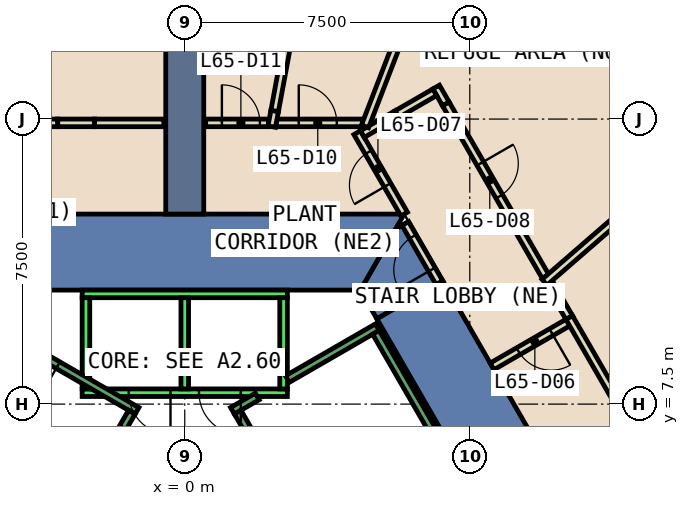
"""IFC4 building model, lengths in metres.
Left out: names, types, materials, properties, quantities, classifications, styles, units other than length and angle.
Written with IfcOpenShell. Run it as: python <this file> out.ifc"""

import sys

from ifc_helpers import new_model, si_unit, direction, frame, frame_2d, origin, place, context, subcontext, project, spatial, polyline, rectangle, outline, extrude, element, fill, save


model = new_model("IFC4")
c1 = context("Model", 3, precision=1e-05, world=origin(), true_north=direction((0.0, 1.0)))
c2 = subcontext(c1, "Body", "Model", "MODEL_VIEW")
j1 = project(units=[si_unit("LENGTHUNIT", "METRE"), si_unit("PLANEANGLEUNIT", "RADIAN")], contexts=[c1])
p1 = place(None, origin())
s1 = spatial("IfcSite", under=j1, at=p1, CompositionType="ELEMENT")
p2 = place(p1, origin())
s2 = spatial("IfcBuilding", under=s1, at=p2, CompositionType="ELEMENT")
p3 = place(p2, frame((0.0, 0.0, 281.0)))
s3 = spatial("IfcBuildingStorey", under=s2, at=p3, CompositionType="ELEMENT", Elevation=281.0)
p4 = place(p3, frame((0.0, 0.0, -0.6)))
e1 = element("IfcWall", 1, at=p4, inside=s3, PredefinedType="SHEAR", context=c2, shape_type="SweptSolid", body=[
    extrude(outline(polyline([(6.786, 10.747), (5.054, 9.747), (9.238, 2.5), (11.547, 2.5), (6.786, 10.747)])), origin(), (0.0, 0.0, 1.0), 5.4),
])
p5 = place(p3, frame((0.0, 0.0, 3.6)))
e2 = element("IfcWall", 2, at=p5, inside=s3, PredefinedType="SHEAR", context=c2, shape_type="SweptSolid", body=[
    extrude(outline(polyline([(5.889, 12.301), (5.544, 12.102), (4.619, 10.5), (5.054, 9.747), (6.786, 10.747), (5.889, 12.301)])), origin(), (0.0, 0.0, 1.0), 1.2),
])
p6 = place(p3, frame((0.0, 0.0, -0.6)))
e3 = element("IfcWall", 3, at=p6, inside=s3, PredefinedType="SHEAR", context=c2, shape_type="SweptSolid", body=[
    extrude(outline(polyline([(5.774, 12.5), (-5.774, 12.5), (-4.619, 10.5), (4.619, 10.5), (5.774, 12.5)])), origin(), (0.0, 0.0, 1.0), 5.4),
])
p7 = place(p3, frame((0.0, 12.5, 0.0), z_axis=(0.0, 0.0, 1.0), x_axis=(0.0, 1.0, 0.0)))
e4 = element("IfcWall", 4, at=p7, inside=s3, PredefinedType="SHEAR", context=c2, shape_type="SweptSolid", body=[
    extrude(rectangle(XDim=16.624, YDim=1.0, at=frame_2d((8.312, 0.0))), origin(), (0.0, 0.0, 1.0), 4.8),
])
p8 = place(p3, frame((10.165, 9.693, 0.0), z_axis=(0.0, 0.0, 1.0), x_axis=(-0.865955154139, -0.50012165622, 0.0)))
e5 = element("IfcWall", 5, at=p8, inside=s3, PredefinedType="PARTITIONING", context=c2, shape_type="SweptSolid", body=[
    extrude(rectangle(XDim=2.4, YDim=0.2, at=frame_2d((1.2, 0.0))), origin(), (0.0, 0.0, 1.0), 2.4),
])
p9 = place(p8, frame((0.6, 0.0, 0.0)))
e6 = element("IfcOpeningElement", 6, at=p9, cuts=e5, PredefinedType="OPENING", context=c2, shape_type="SweptSolid", body=[
    extrude(rectangle(XDim=1.0, YDim=2.1, at=frame_2d((0.5, 1.05))), frame((0.0, 0.11, 0.0), z_axis=(0.0, -1.0, 0.0), x_axis=(1.0, 0.0, 0.0)), (0.0, 0.0, 1.0), 0.22),
])
p10 = place(p3, frame((5.774, 12.5, 0.0), z_axis=(0.0, 0.0, 1.0), x_axis=(-0.500024335136, 0.866011353431, 0.0)))
e7 = element("IfcWall", 7, at=p10, inside=s3, PredefinedType="PARTITIONING", context=c2, shape_type="SweptSolid", body=[
    extrude(rectangle(XDim=2.474, YDim=0.2, at=frame_2d((1.237, 0.0))), origin(), (0.0, 0.0, 1.0), 4.8),
])
p11 = place(p10, frame((0.881, 0.0, 0.0)))
e8 = element("IfcOpeningElement", 8, at=p11, cuts=e7, PredefinedType="OPENING", context=c2, shape_type="SweptSolid", body=[
    extrude(rectangle(XDim=1.0, YDim=2.1, at=frame_2d((0.5, 1.05))), frame((0.0, 0.11, 0.0), z_axis=(0.0, -1.0, 0.0), x_axis=(1.0, 0.0, 0.0)), (0.0, 0.0, 1.0), 0.22),
])
p12 = place(p3, frame((4.674, 14.605, 0.0), z_axis=(0.0, 0.0, 1.0), x_axis=(0.865681519127, 0.500595153234, 0.0)))
e9 = element("IfcWall", 9, at=p12, inside=s3, PredefinedType="PARTITIONING", context=c2, shape_type="SweptSolid", body=[
    extrude(rectangle(XDim=0.589, YDim=0.2, at=frame_2d((0.294, 0.0))), origin(), (0.0, 0.0, 1.0), 4.8),
])
p13 = place(p3, frame((6.615, 15.842, 0.0), z_axis=(0.0, 0.0, 1.0), x_axis=(0.499571276714, -0.866272785837, 0.0)))
e10 = element("IfcWall", 10, at=p13, inside=s3, PredefinedType="PARTITIONING", context=c2, shape_type="SweptSolid", body=[
    extrude(rectangle(XDim=0.513, YDim=0.2, at=frame_2d((0.256, 0.0))), origin(), (0.0, 0.0, 1.0), 2.4),
])
p14 = place(p3, frame((5.184, 14.9, 0.0), z_axis=(0.0, 0.0, 1.0), x_axis=(0.865727674389, 0.500515328234, 0.0)))
e11 = element("IfcWall", 11, at=p14, inside=s3, PredefinedType="PARTITIONING", context=c2, shape_type="SweptSolid", body=[
    extrude(rectangle(XDim=0.462, YDim=0.2, at=frame_2d((0.231, 0.0))), origin(), (0.0, 0.0, 1.0), 4.8),
])
p15 = place(p3, frame((9.592, 10.685, 0.0), z_axis=(0.0, 0.0, 1.0), x_axis=(0.500366091518, -0.865813937552, 0.0)))
e12 = element("IfcWall", 12, at=p15, inside=s3, PredefinedType="PARTITIONING", context=c2, shape_type="SweptSolid", body=[
    extrude(rectangle(XDim=0.23, YDim=0.2, at=frame_2d((0.115, 0.0))), origin(), (0.0, 0.0, 1.0), 4.8),
])
p16 = place(p3, frame((10.115, 9.78, 0.0), z_axis=(0.0, 0.0, 1.0), x_axis=(0.500005696091, -0.86602211512, 0.0)))
e13 = element("IfcWall", 13, at=p16, inside=s3, PredefinedType="PARTITIONING", context=c2, shape_type="SweptSolid", body=[
    extrude(rectangle(XDim=5.82, YDim=0.2, at=frame_2d((2.91, 0.0))), origin(), (0.0, 0.0, 1.0), 2.4),
])
p17 = place(p3, frame((2.407, 14.9, 0.0), z_axis=(0.0, 0.0, 1.0), x_axis=(1.0, 0.0, 0.0)))
e14 = element("IfcWall", 14, at=p17, inside=s3, PredefinedType="PARTITIONING", context=c2, shape_type="SweptSolid", body=[
    extrude(rectangle(XDim=2.272, YDim=0.2, at=frame_2d((1.136, 0.0))), origin(), (0.0, 0.0, 1.0), 4.8),
])
p18 = place(p17, frame((0.593, 0.0, 0.0)))
e15 = element("IfcOpeningElement", 15, at=p18, cuts=e14, PredefinedType="OPENING", context=c2, shape_type="SweptSolid", body=[
    extrude(rectangle(XDim=1.0, YDim=2.1, at=frame_2d((0.5, 1.05))), frame((0.0, 0.11, 0.0), z_axis=(0.0, -1.0, 0.0), x_axis=(1.0, 0.0, 0.0)), (0.0, 0.0, 1.0), 0.22),
])
p19 = place(p3, frame((0.55, 14.9, 0.0), z_axis=(0.0, 0.0, 1.0), x_axis=(1.0, 0.0, 0.0)))
e16 = element("IfcWall", 16, at=p19, inside=s3, PredefinedType="PARTITIONING", context=c2, shape_type="SweptSolid", body=[
    extrude(rectangle(XDim=1.657, YDim=0.2, at=frame_2d((0.829, 0.0))), origin(), (0.0, 0.0, 1.0), 4.8),
])
p20 = place(p19, frame((0.427, 0.0, 0.0)))
e17 = element("IfcOpeningElement", 17, at=p20, cuts=e16, PredefinedType="OPENING", context=c2, shape_type="SweptSolid", body=[
    extrude(rectangle(XDim=1.0, YDim=2.1, at=frame_2d((0.5, 1.05))), frame((0.0, 0.11, 0.0), z_axis=(0.0, -1.0, 0.0), x_axis=(1.0, 0.0, 0.0)), (0.0, 0.0, 1.0), 0.22),
])
p21 = place(p3, frame((4.743, 14.807, 0.0), z_axis=(0.0, 0.0, 1.0), x_axis=(0.359634850081, 0.933093122152, 0.0)))
e18 = element("IfcWall", 18, at=p21, inside=s3, PredefinedType="PARTITIONING", context=c2, shape_type="SweptSolid", body=[
    extrude(rectangle(XDim=10.252, YDim=0.2, at=frame_2d((5.126, 0.0))), origin(), (0.0, 0.0, 1.0), 4.8),
])
p22 = place(p3, frame((2.289, 14.802, 0.0), z_axis=(0.0, 0.0, 1.0), x_axis=(0.183025457922, 0.983108173983, 0.0)))
e19 = element("IfcWall", 19, at=p22, inside=s3, PredefinedType="PARTITIONING", context=c2, shape_type="SweptSolid", body=[
    extrude(rectangle(XDim=0.42, YDim=0.2, at=frame_2d((0.21, 0.0))), origin(), (0.0, 0.0, 1.0), 2.4),
])
p23 = place(p3, frame((6.699, 10.697, 0.0), z_axis=(0.0, 0.0, 1.0), x_axis=(-0.499914839587, 0.866074565589, 0.0)))
e20 = element("IfcWall", 20, at=p23, inside=s3, PredefinedType="PARTITIONING", context=c2, shape_type="SweptSolid", body=[
    extrude(rectangle(XDim=1.794, YDim=0.2, at=frame_2d((0.897, 0.0))), origin(), (0.0, 0.0, 1.0), 2.4),
])
p24 = place(p23, frame((0.397, 0.0, 0.0)))
e21 = element("IfcOpeningElement", 21, at=p24, cuts=e20, PredefinedType="OPENING", context=c2, shape_type="SweptSolid", body=[
    extrude(rectangle(XDim=1.0, YDim=2.1, at=frame_2d((0.5, 1.05))), frame((0.0, 0.11, 0.0), z_axis=(0.0, -1.0, 0.0), x_axis=(1.0, 0.0, 0.0)), (0.0, 0.0, 1.0), 0.22),
])
p25 = place(p3, frame((6.871, 15.398, 0.0), z_axis=(0.0, 0.0, 1.0), x_axis=(0.500031573455, -0.866007174074, 0.0)))
e22 = element("IfcWall", 22, at=p25, inside=s3, PredefinedType="PARTITIONING", context=c2, shape_type="SweptSolid", body=[
    extrude(rectangle(XDim=5.241, YDim=0.2, at=frame_2d((2.621, 0.0))), origin(), (0.0, 0.0, 1.0), 4.8),
])
p26 = place(p25, frame((1.811, 0.0, 0.0)))
e23 = element("IfcOpeningElement", 23, at=p26, cuts=e22, PredefinedType="OPENING", context=c2, shape_type="SweptSolid", body=[
    extrude(rectangle(XDim=1.0, YDim=2.1, at=frame_2d((0.5, 1.05))), frame((0.0, 0.11, 0.0), z_axis=(0.0, -1.0, 0.0), x_axis=(1.0, 0.0, 0.0)), (0.0, 0.0, 1.0), 0.22),
])
p27 = place(p3, frame((5.584, 15.131, 0.0), z_axis=(0.0, 0.0, 1.0), x_axis=(0.865969483213, 0.500096844764, 0.0)))
e24 = element("IfcWall", 24, at=p27, inside=s3, PredefinedType="PARTITIONING", context=c2, shape_type="SweptSolid", body=[
    extrude(rectangle(XDim=1.148, YDim=0.2, at=frame_2d((0.574, 0.0))), origin(), (0.0, 0.0, 1.0), 2.4),
])
p28 = place(p3, frame((9.707, 10.486, 0.0), z_axis=(0.0, 0.0, 1.0), x_axis=(0.500292562113, -0.865856427068, 0.0)))
e25 = element("IfcWall", 25, at=p28, inside=s3, PredefinedType="PARTITIONING", context=c2, shape_type="SweptSolid", body=[
    extrude(rectangle(XDim=0.815, YDim=0.2, at=frame_2d((0.408, 0.0))), origin(), (0.0, 0.0, 1.0), 2.4),
])
p29 = place(p3, frame((14.488, 15.06, 0.0), z_axis=(0.0, 0.0, 1.0), x_axis=(-0.755567874399, -0.65507036811, 0.0)))
e26 = element("IfcWall", 26, at=p29, inside=s3, PredefinedType="PARTITIONING", context=c2, shape_type="SweptSolid", body=[
    extrude(rectangle(XDim=6.647, YDim=0.2, at=frame_2d((3.323, 0.0))), origin(), (0.0, 0.0, 1.0), 4.8),
])
p30 = place(p3, frame((2.366, 15.215, 0.0), z_axis=(0.0, 0.0, 1.0), x_axis=(0.182895721474, 0.983132318188, 0.0)))
e27 = element("IfcWall", 27, at=p30, inside=s3, PredefinedType="PARTITIONING", context=c2, shape_type="SweptSolid", body=[
    extrude(rectangle(XDim=14.85, YDim=0.2, at=frame_2d((7.425, 0.0))), origin(), (0.0, 0.0, 1.0), 4.8),
])
p31 = place(p3, frame((-5.515, 14.9, 0.0), z_axis=(0.0, 0.0, 1.0), x_axis=(1.0, 0.0, 0.0)))
e28 = element("IfcWall", 28, at=p31, inside=s3, PredefinedType="PARTITIONING", context=c2, shape_type="SweptSolid", body=[
    extrude(rectangle(XDim=2.173, YDim=0.2, at=frame_2d((1.086, 0.0))), origin(), (0.0, 0.0, 1.0), 4.8),
])
p32 = place(p3, frame((-3.342, 14.9, 0.0), z_axis=(0.0, 0.0, 1.0), x_axis=(1.0, 0.0, 0.0)))
e29 = element("IfcWall", 29, at=p32, inside=s3, PredefinedType="PARTITIONING", context=c2, shape_type="SweptSolid", body=[
    extrude(rectangle(XDim=0.969, YDim=0.2, at=frame_2d((0.484, 0.0))), origin(), (0.0, 0.0, 1.0), 2.4),
])
p33 = place(p3, frame((-2.373, 14.9, 0.0), z_axis=(0.0, 0.0, 1.0), x_axis=(1.0, 0.0, 0.0)))
e30 = element("IfcWall", 30, at=p33, inside=s3, PredefinedType="PARTITIONING", context=c2, shape_type="SweptSolid", body=[
    extrude(rectangle(XDim=1.823, YDim=0.2, at=frame_2d((0.912, 0.0))), origin(), (0.0, 0.0, 1.0), 4.8),
])
p34 = place(p3, frame((2.7, 7.8, 0.0), z_axis=(0.0, 0.0, 1.0), x_axis=(-1.0, 0.0, 0.0)))
e31 = element("IfcWall", 31, at=p34, inside=s3, PredefinedType="STANDARD", context=c2, shape_type="SweptSolid", body=[
    extrude(rectangle(XDim=5.4, YDim=0.2, at=frame_2d((2.7, 0.0))), origin(), (0.0, 0.0, 1.0), 4.8),
])
p35 = place(p34, frame((1.225, 0.0, 0.0)))
e32 = element("IfcOpeningElement", 32, at=p35, cuts=e31, PredefinedType="OPENING", context=c2, shape_type="SweptSolid", body=[
    extrude(rectangle(XDim=1.1, YDim=2.1, at=frame_2d((0.55, 1.05))), frame((0.0, 0.11, 0.0), z_axis=(0.0, -1.0, 0.0), x_axis=(1.0, 0.0, 0.0)), (0.0, 0.0, 1.0), 0.22),
])
p36 = place(p34, frame((3.075, 0.0, 0.0)))
e33 = element("IfcOpeningElement", 33, at=p36, cuts=e31, PredefinedType="OPENING", context=c2, shape_type="SweptSolid", body=[
    extrude(rectangle(XDim=1.1, YDim=2.1, at=frame_2d((0.55, 1.05))), frame((0.0, 0.11, 0.0), z_axis=(0.0, -1.0, 0.0), x_axis=(1.0, 0.0, 0.0)), (0.0, 0.0, 1.0), 0.22),
])
p37 = place(p3, frame((2.7, 10.4, 0.0), z_axis=(0.0, 0.0, 1.0), x_axis=(-1.0, 0.0, 0.0)))
e34 = element("IfcWall", 34, at=p37, inside=s3, PredefinedType="STANDARD", context=c2, shape_type="SweptSolid", body=[
    extrude(rectangle(XDim=5.4, YDim=0.2, at=frame_2d((2.7, 0.0))), origin(), (0.0, 0.0, 1.0), 4.8),
])
for number, where, z_axis, x_axis in (
    (35, (2.6, 7.9, 0.0), (0.0, 0.0, 1.0), (0.0, 1.0, 0.0)),
    (36, (0.0, 7.9, 0.0), (0.0, 0.0, 1.0), (0.0, 1.0, 0.0)),
    (37, (-2.6, 7.9, 0.0), (0.0, 0.0, 1.0), (0.0, 1.0, 0.0)),
):
    element("IfcWall", number, at=place(p3, frame(where, z_axis=z_axis, x_axis=x_axis)), inside=s3, PredefinedType="STANDARD", context=c2, shape_type="SweptSolid", body=[
        extrude(rectangle(XDim=2.4, YDim=0.2, at=frame_2d((1.2, 0.0))), origin(), (0.0, 0.0, 1.0), 4.8),
    ])
p38 = place(p3, frame((2.7, 8.158, 0.0), z_axis=(0.0, 0.0, 1.0), x_axis=(0.86611865017, 0.499838457731, 0.0)))
e38 = element("IfcWall", 38, at=p38, inside=s3, PredefinedType="STANDARD", context=c2, shape_type="SweptSolid", body=[
    extrude(rectangle(XDim=2.733, YDim=0.2, at=frame_2d((1.366, 0.0))), origin(), (0.0, 0.0, 1.0), 4.8),
])
p39 = place(p3, frame((1.256, 7.324, 0.0), z_axis=(0.0, 0.0, 1.0), x_axis=(0.865915093549, 0.500191014278, 0.0)))
e39 = element("IfcWall", 39, at=p39, inside=s3, PredefinedType="STANDARD", context=c2, shape_type="SweptSolid", body=[
    extrude(rectangle(XDim=0.752, YDim=0.2, at=frame_2d((0.376, 0.0))), origin(), (0.0, 0.0, 1.0), 4.8),
])
p40 = place(p3, frame((4.843, 1.312, 0.0), z_axis=(0.0, 0.0, 1.0), x_axis=(-0.499963383562, 0.866046543262, 0.0)))
e40 = element("IfcWall", 40, at=p40, inside=s3, PredefinedType="STANDARD", context=c2, shape_type="SweptSolid", body=[
    extrude(rectangle(XDim=6.9, YDim=0.2, at=frame_2d((3.45, 0.0))), origin(), (0.0, 0.0, 1.0), 4.8),
])
p41 = place(p40, frame((0.45, 0.0, 0.0)))
e41 = element("IfcOpeningElement", 41, at=p41, cuts=e40, PredefinedType="OPENING", context=c2, shape_type="SweptSolid", body=[
    extrude(rectangle(XDim=1.1, YDim=2.2, at=frame_2d((0.55, 1.1))), frame((0.0, 0.11, 0.0), z_axis=(0.0, -1.0, 0.0), x_axis=(1.0, 0.0, 0.0)), (0.0, 0.0, 1.0), 0.22),
])
p42 = place(p3, frame((8.48, 3.412, 0.0), z_axis=(0.0, 0.0, 1.0), x_axis=(-0.499978703459, 0.866037698999, 0.0)))
e42 = element("IfcWall", 42, at=p42, inside=s3, PredefinedType="STANDARD", context=c2, shape_type="SweptSolid", body=[
    extrude(rectangle(XDim=6.9, YDim=0.2, at=frame_2d((3.45, 0.0))), origin(), (0.0, 0.0, 1.0), 4.8),
])
p43 = place(p3, frame((-1.256, 7.324, 0.0), z_axis=(0.0, 0.0, 1.0), x_axis=(-0.866046073146, 0.499964197906, 0.0)))
e43 = element("IfcWall", 43, at=p43, inside=s3, PredefinedType="STANDARD", context=c2, shape_type="SweptSolid", body=[
    extrude(rectangle(XDim=4.4, YDim=0.2, at=frame_2d((2.2, 0.0))), origin(), (0.0, 0.0, 1.0), 4.8),
])
p44 = place(p43, frame((2.4, 0.0, 0.0)))
e44 = element("IfcOpeningElement", 44, at=p44, cuts=e43, PredefinedType="OPENING", context=c2, shape_type="SweptSolid", body=[
    extrude(rectangle(XDim=1.1, YDim=2.2, at=frame_2d((0.55, 1.1))), frame((0.0, 0.11, 0.0), z_axis=(0.0, -1.0, 0.0), x_axis=(1.0, 0.0, 0.0)), (0.0, 0.0, 1.0), 0.22),
])
p45 = place(p3, frame((-1.393, 7.288, 0.0), z_axis=(0.0, 0.0, 1.0), x_axis=(-0.499963383562, -0.866046543262, 0.0)))
e45 = element("IfcWall", 45, at=p45, inside=s3, PredefinedType="STANDARD", context=c2, shape_type="SweptSolid", body=[
    extrude(rectangle(XDim=6.9, YDim=0.2, at=frame_2d((3.45, 0.0))), origin(), (0.0, 0.0, 1.0), 4.8),
])
p46 = place(p45, frame((0.45, 0.0, 0.0)))
e46 = element("IfcOpeningElement", 46, at=p46, cuts=e45, PredefinedType="OPENING", context=c2, shape_type="SweptSolid", body=[
    extrude(rectangle(XDim=1.1, YDim=2.2, at=frame_2d((0.55, 1.1))), frame((0.0, 0.11, 0.0), z_axis=(0.0, -1.0, 0.0), x_axis=(1.0, 0.0, 0.0)), (0.0, 0.0, 1.0), 0.22),
])
p47 = place(p9, origin())
e47 = element("IfcDoor", 47, at=p47, inside=s3, OperationType="SINGLE_SWING_LEFT", PredefinedType="DOOR", context=c2, shape_type="SweptSolid", body=[
    extrude(rectangle(XDim=1.0, YDim=2.1, at=frame_2d((0.5, 1.05))), frame((0.0, 0.025, 0.0), z_axis=(0.0, -1.0, 0.0), x_axis=(1.0, 0.0, 0.0)), (0.0, 0.0, 1.0), 0.05),
])
fill(e6, e47)
p48 = place(p11, origin())
e48 = element("IfcDoor", 48, at=p48, inside=s3, OperationType="SINGLE_SWING_RIGHT", PredefinedType="DOOR", context=c2, shape_type="SweptSolid", body=[
    extrude(rectangle(XDim=1.0, YDim=2.1, at=frame_2d((0.5, 1.05))), frame((0.0, 0.025, 0.0), z_axis=(0.0, -1.0, 0.0), x_axis=(1.0, 0.0, 0.0)), (0.0, 0.0, 1.0), 0.05),
])
fill(e8, e48)
p49 = place(p26, origin())
e49 = element("IfcDoor", 49, at=p49, inside=s3, OperationType="SINGLE_SWING_LEFT", PredefinedType="DOOR", context=c2, shape_type="SweptSolid", body=[
    extrude(rectangle(XDim=1.0, YDim=2.1, at=frame_2d((0.5, 1.05))), frame((0.0, 0.025, 0.0), z_axis=(0.0, -1.0, 0.0), x_axis=(1.0, 0.0, 0.0)), (0.0, 0.0, 1.0), 0.05),
])
fill(e23, e49)
p50 = place(p18, origin())
e50 = element("IfcDoor", 50, at=p50, inside=s3, OperationType="SINGLE_SWING_LEFT", PredefinedType="DOOR", context=c2, shape_type="SweptSolid", body=[
    extrude(rectangle(XDim=1.0, YDim=2.1, at=frame_2d((0.5, 1.05))), frame((0.0, 0.025, 0.0), z_axis=(0.0, -1.0, 0.0), x_axis=(1.0, 0.0, 0.0)), (0.0, 0.0, 1.0), 0.05),
])
fill(e15, e50)
p51 = place(p20, origin())
e51 = element("IfcDoor", 51, at=p51, inside=s3, OperationType="SINGLE_SWING_RIGHT", PredefinedType="DOOR", context=c2, shape_type="SweptSolid", body=[
    extrude(rectangle(XDim=1.0, YDim=2.1, at=frame_2d((0.5, 1.05))), frame((0.0, 0.025, 0.0), z_axis=(0.0, -1.0, 0.0), x_axis=(1.0, 0.0, 0.0)), (0.0, 0.0, 1.0), 0.05),
])
fill(e17, e51)
p52 = place(p24, origin())
e52 = element("IfcDoor", 52, at=p52, inside=s3, OperationType="SINGLE_SWING_LEFT", PredefinedType="DOOR", context=c2, shape_type="SweptSolid", body=[
    extrude(rectangle(XDim=1.0, YDim=2.1, at=frame_2d((0.5, 1.05))), frame((0.0, 0.025, 0.0), z_axis=(0.0, -1.0, 0.0), x_axis=(1.0, 0.0, 0.0)), (0.0, 0.0, 1.0), 0.05),
])
fill(e21, e52)
p53 = place(p35, origin())
e53 = element("IfcDoor", 53, at=p53, inside=s3, OperationType="SLIDING_TO_LEFT", PredefinedType="DOOR", context=c2, shape_type="SweptSolid", body=[
    extrude(rectangle(XDim=1.1, YDim=2.1, at=frame_2d((0.55, 1.05))), frame((0.0, 0.025, 0.0), z_axis=(0.0, -1.0, 0.0), x_axis=(1.0, 0.0, 0.0)), (0.0, 0.0, 1.0), 0.05),
])
fill(e32, e53)
p54 = place(p36, origin())
e54 = element("IfcDoor", 54, at=p54, inside=s3, OperationType="SLIDING_TO_LEFT", PredefinedType="DOOR", context=c2, shape_type="SweptSolid", body=[
    extrude(rectangle(XDim=1.1, YDim=2.1, at=frame_2d((0.55, 1.05))), frame((0.0, 0.025, 0.0), z_axis=(0.0, -1.0, 0.0), x_axis=(1.0, 0.0, 0.0)), (0.0, 0.0, 1.0), 0.05),
])
fill(e33, e54)
p55 = place(p46, origin())
e55 = element("IfcDoor", 55, at=p55, inside=s3, OperationType="SINGLE_SWING_LEFT", PredefinedType="DOOR", context=c2, shape_type="SweptSolid", body=[
    extrude(rectangle(XDim=1.1, YDim=2.2, at=frame_2d((0.55, 1.1))), frame((0.0, 0.025, 0.0), z_axis=(0.0, -1.0, 0.0), x_axis=(1.0, 0.0, 0.0)), (0.0, 0.0, 1.0), 0.05),
])
fill(e46, e55)
p56 = place(p44, origin())
e56 = element("IfcDoor", 56, at=p56, inside=s3, OperationType="SINGLE_SWING_LEFT", PredefinedType="DOOR", context=c2, shape_type="SweptSolid", body=[
    extrude(rectangle(XDim=1.1, YDim=2.2, at=frame_2d((0.55, 1.1))), frame((0.0, 0.025, 0.0), z_axis=(0.0, -1.0, 0.0), x_axis=(1.0, 0.0, 0.0)), (0.0, 0.0, 1.0), 0.05),
])
fill(e44, e56)
save(model, sys.argv[1])
